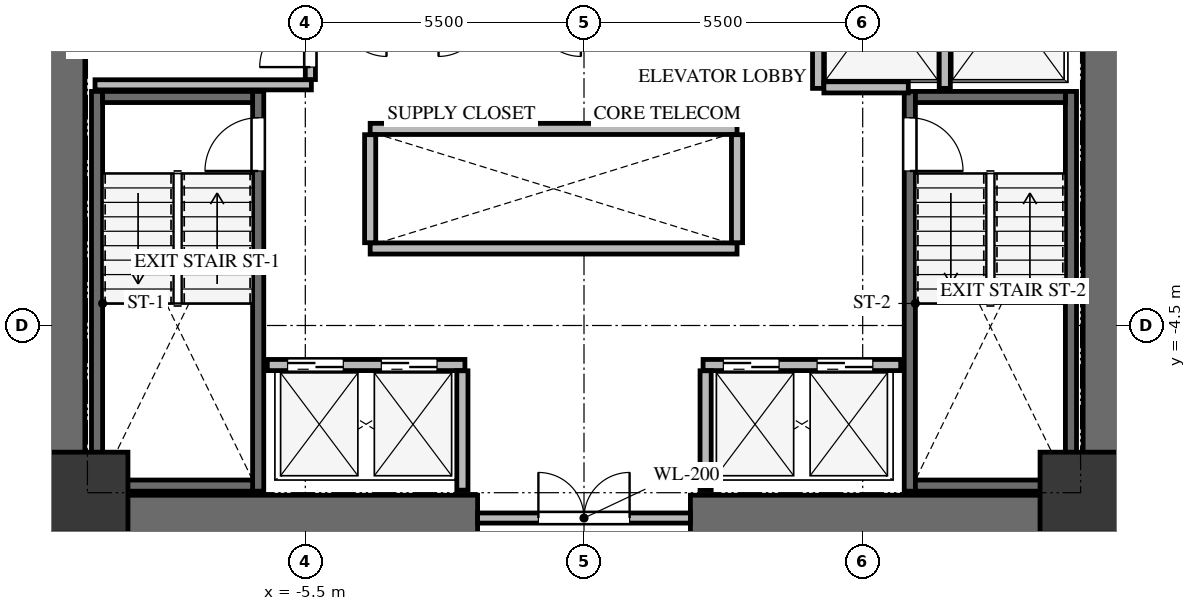
"""IFC4 building model, lengths in metres.
Left out: names, types, materials, properties, quantities, classifications, styles, units other than length and angle.
Written with IfcOpenShell. Run it as: python <this file> out.ifc"""

import sys

from ifc_helpers import new_model, si_unit, direction, frame, frame_2d, origin, origin_2d, place, context, subcontext, project, spatial, rectangle, extrude, source, transform, mapped, element, fill, save


model = new_model("IFC4")
c1 = context("Model", 3, precision=1e-05, world=origin(), true_north=direction((0.0, 1.0)))
c2 = subcontext(c1, "Body", "Model", "MODEL_VIEW")
j1 = project(units=[si_unit("LENGTHUNIT", "METRE"), si_unit("PLANEANGLEUNIT", "RADIAN")], contexts=[c1])
p1 = place(None, origin())
s1 = spatial("IfcSite", under=j1, at=p1, CompositionType="ELEMENT")
p2 = place(p1, origin())
s2 = spatial("IfcBuilding", under=s1, at=p2, CompositionType="ELEMENT")
p3 = place(p2, frame((0.0, 0.0, 52.2)))
s3 = spatial("IfcBuildingStorey", under=s2, at=p3, CompositionType="ELEMENT", Elevation=52.2)
for number, where, z_axis, x_axis in (
    (1, (-10.3, -8.75, 0.0), (0.0, 0.0, 1.0), (0.0, 1.0, 0.0)),
    (2, (10.3, -8.75, 0.0), (0.0, 0.0, 1.0), (0.0, 1.0, 0.0)),
):
    element("IfcWall", number, at=place(p3, frame(where, z_axis=z_axis, x_axis=x_axis)), inside=s3, PredefinedType="SHEAR", context=c2, shape_type="SweptSolid", body=[
        extrude(rectangle(XDim=17.5, YDim=0.9, at=frame_2d((8.75, 0.0))), origin(), (0.0, 0.0, 1.0), 3.3),
    ])
for number, where, z_axis, x_axis in (
    (3, (-9.85, -8.3, 0.0), (0.0, 0.0, 1.0), (1.0, 0.0, 0.0)),
    (4, (2.1, -8.3, 0.0), (0.0, 0.0, 1.0), (1.0, 0.0, 0.0)),
):
    element("IfcWall", number, at=place(p3, frame(where, z_axis=z_axis, x_axis=x_axis)), inside=s3, PredefinedType="SHEAR", context=c2, shape_type="SweptSolid", body=[
        extrude(rectangle(XDim=7.75, YDim=0.9, at=frame_2d((3.875, 0.0))), origin(), (0.0, 0.0, 1.0), 3.3),
    ])
p4 = place(p3, frame((-6.43, -7.77, -0.24), z_axis=(0.0, 0.0, 1.0), x_axis=(0.0, 1.0, 0.0)))
e5 = element("IfcWall", 5, at=p4, inside=s3, PredefinedType="SHEAR", context=c2, shape_type="SweptSolid", body=[
    extrude(rectangle(XDim=7.89, YDim=0.22, at=frame_2d((3.945, 0.0))), origin(), (0.0, 0.0, 1.0), 3.3),
])
p5 = place(p4, frame((6.32, 0.0, 0.0)))
e6 = element("IfcOpeningElement", 6, at=p5, cuts=e5, PredefinedType="OPENING", context=c2, shape_type="SweptSolid", body=[
    extrude(rectangle(XDim=1.05, YDim=2.15, at=frame_2d((0.525, 1.075))), frame((0.0, 0.12, 0.0), z_axis=(0.0, -1.0, 0.0), x_axis=(1.0, 0.0, 0.0)), (0.0, 0.0, 1.0), 0.24),
])
p6 = place(p3, frame((-9.61, 0.12, -0.24), z_axis=(0.0, 0.0, 1.0), x_axis=(0.0, -1.0, 0.0)))
e7 = element("IfcWall", 7, at=p6, inside=s3, PredefinedType="SHEAR", context=c2, shape_type="SweptSolid", body=[
    extrude(rectangle(XDim=7.89, YDim=0.22, at=frame_2d((3.945, 0.0))), origin(), (0.0, 0.0, 1.0), 3.3),
])
for number, where, z_axis, x_axis in (
    (8, (-9.5, -7.66, -0.24), (0.0, 0.0, 1.0), (1.0, 0.0, 0.0)),
    (9, (-6.54, 0.01, -0.24), (0.0, 0.0, 1.0), (-1.0, 0.0, 0.0)),
):
    element("IfcWall", number, at=place(p3, frame(where, z_axis=z_axis, x_axis=x_axis)), inside=s3, PredefinedType="SHEAR", context=c2, shape_type="SweptSolid", body=[
        extrude(rectangle(XDim=2.96, YDim=0.22, at=frame_2d((1.48, 0.0))), origin(), (0.0, 0.0, 1.0), 3.3),
    ])
p7 = place(p3, frame((9.61, -7.77, -0.24), z_axis=(0.0, 0.0, 1.0), x_axis=(0.0, 1.0, 0.0)))
e10 = element("IfcWall", 10, at=p7, inside=s3, PredefinedType="SHEAR", context=c2, shape_type="SweptSolid", body=[
    extrude(rectangle(XDim=7.89, YDim=0.22, at=frame_2d((3.945, 0.0))), origin(), (0.0, 0.0, 1.0), 3.3),
])
p8 = place(p3, frame((6.43, 0.12, -0.24), z_axis=(0.0, 0.0, 1.0), x_axis=(0.0, -1.0, 0.0)))
e11 = element("IfcWall", 11, at=p8, inside=s3, PredefinedType="SHEAR", context=c2, shape_type="SweptSolid", body=[
    extrude(rectangle(XDim=7.89, YDim=0.22, at=frame_2d((3.945, 0.0))), origin(), (0.0, 0.0, 1.0), 3.3),
])
p9 = place(p8, frame((0.52, 0.0, 0.0)))
e12 = element("IfcOpeningElement", 12, at=p9, cuts=e11, PredefinedType="OPENING", context=c2, shape_type="SweptSolid", body=[
    extrude(rectangle(XDim=1.05, YDim=2.15, at=frame_2d((0.525, 1.075))), frame((0.0, 0.12, 0.0), z_axis=(0.0, -1.0, 0.0), x_axis=(1.0, 0.0, 0.0)), (0.0, 0.0, 1.0), 0.24),
])
for number, where, z_axis, x_axis in (
    (13, (6.54, -7.66, -0.24), (0.0, 0.0, 1.0), (1.0, 0.0, 0.0)),
    (14, (9.5, 0.01, -0.24), (0.0, 0.0, 1.0), (-1.0, 0.0, 0.0)),
):
    element("IfcWall", number, at=place(p3, frame(where, z_axis=z_axis, x_axis=x_axis)), inside=s3, PredefinedType="SHEAR", context=c2, shape_type="SweptSolid", body=[
        extrude(rectangle(XDim=2.96, YDim=0.22, at=frame_2d((1.48, 0.0))), origin(), (0.0, 0.0, 1.0), 3.3),
    ])
m1 = source(origin(), c2, "Body", "SweptSolid", [
    extrude(rectangle(XDim=1.6, YDim=1.6, at=origin_2d()), origin(), (0.0, 0.0, 1.0), 3.3),
])
for number, where, z_axis, x_axis in (
    (15, (-9.8, -7.8, -0.24), (0.0, 0.0, 1.0), (1.0, 0.0, 0.0)),
    (16, (9.8, -7.8, -0.24), (0.0, 0.0, 1.0), (1.0, 0.0, 0.0)),
):
    element("IfcColumn", number, at=place(p3, frame(where, z_axis=z_axis, x_axis=x_axis)), inside=s3, PredefinedType="COLUMN", context=c2, shape_type="MappedRepresentation", body=[
        mapped(m1, transform((0.0, 0.0, 0.0), x_axis=(1.0, 0.0, 0.0), y_axis=(0.0, 1.0, 0.0), z_axis=(0.0, 0.0, 1.0), scale=1.0)),
    ])
p10 = place(p3, frame((-2.1, -8.3, 0.0), z_axis=(0.0, 0.0, 1.0), x_axis=(1.0, 0.0, 0.0)))
e17 = element("IfcWall", 17, at=p10, inside=s3, PredefinedType="SOLIDWALL", context=c2, shape_type="SweptSolid", body=[
    extrude(rectangle(XDim=4.2, YDim=0.2, at=frame_2d((2.1, 0.0))), origin(), (0.0, 0.0, 1.0), 3.045),
])
p11 = place(p10, frame((1.2, 0.0, 0.0)))
e18 = element("IfcOpeningElement", 18, at=p11, cuts=e17, PredefinedType="OPENING", context=c2, shape_type="SweptSolid", body=[
    extrude(rectangle(XDim=1.8, YDim=2.15, at=frame_2d((0.9, 1.075))), frame((0.0, 0.11, 0.0), z_axis=(0.0, -1.0, 0.0), x_axis=(1.0, 0.0, 0.0)), (0.0, 0.0, 1.0), 0.22),
])
p12 = place(p3, frame((-9.65, 0.25, 0.0), z_axis=(0.0, 0.0, 1.0), x_axis=(1.0, 0.0, 0.0)))
e19 = element("IfcWall", 19, at=p12, inside=s3, PredefinedType="SOLIDWALL", context=c2, shape_type="SweptSolid", body=[
    extrude(rectangle(XDim=4.27, YDim=0.2, at=frame_2d((2.135, 0.0))), origin(), (0.0, 0.0, 1.0), 3.045),
])
p13 = place(p3, frame((-5.4, 0.354, 0.0), z_axis=(0.0, 0.0, 1.0), x_axis=(0.0, 1.0, 0.0)))
e20 = element("IfcWall", 20, at=p13, inside=s3, PredefinedType="SOLIDWALL", context=c2, shape_type="SweptSolid", body=[
    extrude(rectangle(XDim=4.026, YDim=0.2, at=frame_2d((2.013, 0.0))), origin(), (0.0, 0.0, 1.0), 3.045),
])
p14 = place(p13, frame((0.246, 0.0, 0.0)))
e21 = element("IfcOpeningElement", 21, at=p14, cuts=e20, PredefinedType="OPENING", context=c2, shape_type="SweptSolid", body=[
    extrude(rectangle(XDim=1.0, YDim=2.15, at=frame_2d((0.5, 1.075))), frame((0.0, 0.11, 0.0), z_axis=(0.0, -1.0, 0.0), x_axis=(1.0, 0.0, 0.0)), (0.0, 0.0, 1.0), 0.22),
])
for number, where, z_axis, x_axis in (
    (22, (4.62, 0.18, 0.0), (0.0, 0.0, 1.0), (0.0, 1.0, 0.0)),
    (23, (7.12, 0.18, 0.0), (0.0, 0.0, 1.0), (0.0, 1.0, 0.0)),
):
    element("IfcWall", number, at=place(p3, frame(where, z_axis=z_axis, x_axis=x_axis)), inside=s3, PredefinedType="SOLIDWALL", context=c2, shape_type="SweptSolid", body=[
        extrude(rectangle(XDim=3.186, YDim=0.22, at=frame_2d((1.593, 0.0))), origin(), (0.0, 0.0, 1.0), 3.045),
    ])
p15 = place(p3, frame((4.734, 0.2, 0.0), z_axis=(0.0, 0.0, 1.0), x_axis=(1.0, 0.0, 0.0)))
e24 = element("IfcWall", 24, at=p15, inside=s3, PredefinedType="SOLIDWALL", context=c2, shape_type="SweptSolid", body=[
    extrude(rectangle(XDim=1.666, YDim=0.22, at=frame_2d((0.833, 0.0))), origin(), (0.0, 0.0, 1.0), 3.045),
])
p16 = place(p3, frame((-6.25, -5.28, 0.0), z_axis=(0.0, 0.0, 1.0), x_axis=(1.0, 0.0, 0.0)))
e25 = element("IfcWall", 25, at=p16, inside=s3, PredefinedType="SOLIDWALL", context=c2, shape_type="SweptSolid", body=[
    extrude(rectangle(XDim=3.9, YDim=0.22, at=frame_2d((1.95, 0.0))), origin(), (0.0, 0.0, 1.0), 3.045),
])
p17 = place(p16, frame((0.4, 0.0, 0.0)))
e26 = element("IfcOpeningElement", 26, at=p17, cuts=e25, PredefinedType="OPENING", context=c2, shape_type="SweptSolid", body=[
    extrude(rectangle(XDim=1.1, YDim=2.15, at=frame_2d((0.55, 1.075))), frame((0.0, 0.12, 0.0), z_axis=(0.0, -1.0, 0.0), x_axis=(1.0, 0.0, 0.0)), (0.0, 0.0, 1.0), 0.24),
])
p18 = place(p16, frame((2.25, 0.0, 0.0)))
e27 = element("IfcOpeningElement", 27, at=p18, cuts=e25, PredefinedType="OPENING", context=c2, shape_type="SweptSolid", body=[
    extrude(rectangle(XDim=1.1, YDim=2.15, at=frame_2d((0.55, 1.075))), frame((0.0, 0.12, 0.0), z_axis=(0.0, -1.0, 0.0), x_axis=(1.0, 0.0, 0.0)), (0.0, 0.0, 1.0), 0.24),
])
p19 = place(p3, frame((2.35, -5.28, 0.0), z_axis=(0.0, 0.0, 1.0), x_axis=(1.0, 0.0, 0.0)))
e28 = element("IfcWall", 28, at=p19, inside=s3, PredefinedType="SOLIDWALL", context=c2, shape_type="SweptSolid", body=[
    extrude(rectangle(XDim=3.9, YDim=0.22, at=frame_2d((1.95, 0.0))), origin(), (0.0, 0.0, 1.0), 3.045),
])
p20 = place(p19, frame((0.4, 0.0, 0.0)))
e29 = element("IfcOpeningElement", 29, at=p20, cuts=e28, PredefinedType="OPENING", context=c2, shape_type="SweptSolid", body=[
    extrude(rectangle(XDim=1.1, YDim=2.15, at=frame_2d((0.55, 1.075))), frame((0.0, 0.12, 0.0), z_axis=(0.0, -1.0, 0.0), x_axis=(1.0, 0.0, 0.0)), (0.0, 0.0, 1.0), 0.24),
])
p21 = place(p19, frame((2.25, 0.0, 0.0)))
e30 = element("IfcOpeningElement", 30, at=p21, cuts=e28, PredefinedType="OPENING", context=c2, shape_type="SweptSolid", body=[
    extrude(rectangle(XDim=1.1, YDim=2.15, at=frame_2d((0.55, 1.075))), frame((0.0, 0.12, 0.0), z_axis=(0.0, -1.0, 0.0), x_axis=(1.0, 0.0, 0.0)), (0.0, 0.0, 1.0), 0.24),
])
for number, where, z_axis, x_axis in (
    (31, (-2.4, -7.75, 0.0), (0.0, 0.0, 1.0), (0.0, 1.0, 0.0)),
    (32, (2.4, -7.75, 0.0), (0.0, 0.0, 1.0), (0.0, 1.0, 0.0)),
):
    element("IfcWall", number, at=place(p3, frame(where, z_axis=z_axis, x_axis=x_axis)), inside=s3, PredefinedType="SOLIDWALL", context=c2, shape_type="SweptSolid", body=[
        extrude(rectangle(XDim=2.356, YDim=0.22, at=frame_2d((1.178, 0.0))), origin(), (0.0, 0.0, 1.0), 3.045),
    ])
for number, where, z_axis, x_axis in (
    (33, (-4.22, -2.98, 0.0), (0.0, 0.0, 1.0), (1.0, 0.0, 0.0)),
    (34, (-4.22, -0.62, 0.0), (0.0, 0.0, 1.0), (1.0, 0.0, 0.0)),
):
    element("IfcWall", number, at=place(p3, frame(where, z_axis=z_axis, x_axis=x_axis)), inside=s3, PredefinedType="SOLIDWALL", context=c2, shape_type="SweptSolid", body=[
        extrude(rectangle(XDim=7.24, YDim=0.22, at=frame_2d((3.62, 0.0))), origin(), (0.0, 0.0, 1.0), 3.045),
    ])
for number, where, z_axis, x_axis in (
    (35, (-4.22, -2.866, 0.0), (0.0, 0.0, 1.0), (0.0, 1.0, 0.0)),
    (36, (3.02, -2.866, 0.0), (0.0, 0.0, 1.0), (0.0, 1.0, 0.0)),
):
    element("IfcWall", number, at=place(p3, frame(where, z_axis=z_axis, x_axis=x_axis)), inside=s3, PredefinedType="SOLIDWALL", context=c2, shape_type="SweptSolid", body=[
        extrude(rectangle(XDim=2.132, YDim=0.22, at=frame_2d((1.066, 0.0))), origin(), (0.0, 0.0, 1.0), 3.045),
    ])
m2 = source(origin(), c2, "Body", "SweptSolid", [
    extrude(rectangle(XDim=1.05, YDim=2.15, at=frame_2d((0.525, 1.075))), frame((0.0, 0.025, 0.0), z_axis=(0.0, -1.0, 0.0), x_axis=(1.0, 0.0, 0.0)), (0.0, 0.0, 1.0), 0.05),
])
p22 = place(p5, origin())
e37 = element("IfcDoor", 37, at=p22, inside=s3, OperationType="SINGLE_SWING_LEFT", PredefinedType="DOOR", context=c2, shape_type="MappedRepresentation", body=[
    mapped(m2, transform((0.0, 0.0, 0.0), x_axis=(1.0, 0.0, 0.0), y_axis=(0.0, 1.0, 0.0), z_axis=(0.0, 0.0, 1.0), scale=1.0)),
])
fill(e6, e37)
m3 = source(origin(), c2, "Body", "SweptSolid", [
    extrude(rectangle(XDim=1.05, YDim=2.15, at=frame_2d((0.525, 1.075))), frame((0.0, 0.025, 0.0), z_axis=(0.0, -1.0, 0.0), x_axis=(1.0, 0.0, 0.0)), (0.0, 0.0, 1.0), 0.05),
])
p23 = place(p9, origin())
e38 = element("IfcDoor", 38, at=p23, inside=s3, OperationType="SINGLE_SWING_RIGHT", PredefinedType="DOOR", context=c2, shape_type="MappedRepresentation", body=[
    mapped(m3, transform((0.0, 0.0, 0.0), x_axis=(1.0, 0.0, 0.0), y_axis=(0.0, 1.0, 0.0), z_axis=(0.0, 0.0, 1.0), scale=1.0)),
])
fill(e12, e38)
m4 = source(origin(), c2, "Body", "SweptSolid", [
    extrude(rectangle(XDim=1.8, YDim=2.15, at=frame_2d((0.9, 1.075))), frame((0.0, 0.025, 0.0), z_axis=(0.0, -1.0, 0.0), x_axis=(1.0, 0.0, 0.0)), (0.0, 0.0, 1.0), 0.05),
])
p24 = place(p11, origin())
e39 = element("IfcDoor", 39, at=p24, inside=s3, OperationType="DOUBLE_DOOR_SINGLE_SWING", PredefinedType="DOOR", context=c2, shape_type="MappedRepresentation", body=[
    mapped(m4, transform((0.0, 0.0, 0.0), x_axis=(1.0, 0.0, 0.0), y_axis=(0.0, 1.0, 0.0), z_axis=(0.0, 0.0, 1.0), scale=1.0)),
])
fill(e18, e39)
m5 = source(origin(), c2, "Body", "SweptSolid", [
    extrude(rectangle(XDim=1.0, YDim=2.15, at=frame_2d((0.5, 1.075))), frame((0.0, 0.025, 0.0), z_axis=(0.0, -1.0, 0.0), x_axis=(1.0, 0.0, 0.0)), (0.0, 0.0, 1.0), 0.05),
])
p25 = place(p14, origin())
e40 = element("IfcDoor", 40, at=p25, inside=s3, OperationType="SINGLE_SWING_LEFT", PredefinedType="DOOR", context=c2, shape_type="MappedRepresentation", body=[
    mapped(m5, transform((0.0, 0.0, 0.0), x_axis=(1.0, 0.0, 0.0), y_axis=(0.0, 1.0, 0.0), z_axis=(0.0, 0.0, 1.0), scale=1.0)),
])
fill(e21, e40)
m6 = source(origin(), c2, "Body", "SweptSolid", [
    extrude(rectangle(XDim=1.1, YDim=2.15, at=frame_2d((0.55, 1.075))), frame((0.0, 0.025, 0.0), z_axis=(0.0, -1.0, 0.0), x_axis=(1.0, 0.0, 0.0)), (0.0, 0.0, 1.0), 0.05),
])
p26 = place(p17, origin())
e41 = element("IfcDoor", 41, at=p26, inside=s3, OperationType="DOUBLE_DOOR_SLIDING", PredefinedType="DOOR", context=c2, shape_type="MappedRepresentation", body=[
    mapped(m6, transform((0.0, 0.0, 0.0), x_axis=(1.0, 0.0, 0.0), y_axis=(0.0, 1.0, 0.0), z_axis=(0.0, 0.0, 1.0), scale=1.0)),
])
fill(e26, e41)
p27 = place(p18, origin())
e42 = element("IfcDoor", 42, at=p27, inside=s3, OperationType="DOUBLE_DOOR_SLIDING", PredefinedType="DOOR", context=c2, shape_type="MappedRepresentation", body=[
    mapped(m6, transform((0.0, 0.0, 0.0), x_axis=(1.0, 0.0, 0.0), y_axis=(0.0, 1.0, 0.0), z_axis=(0.0, 0.0, 1.0), scale=1.0)),
])
fill(e27, e42)
p28 = place(p20, origin())
e43 = element("IfcDoor", 43, at=p28, inside=s3, OperationType="DOUBLE_DOOR_SLIDING", PredefinedType="DOOR", context=c2, shape_type="MappedRepresentation", body=[
    mapped(m6, transform((0.0, 0.0, 0.0), x_axis=(1.0, 0.0, 0.0), y_axis=(0.0, 1.0, 0.0), z_axis=(0.0, 0.0, 1.0), scale=1.0)),
])
fill(e29, e43)
p29 = place(p21, origin())
e44 = element("IfcDoor", 44, at=p29, inside=s3, OperationType="DOUBLE_DOOR_SLIDING", PredefinedType="DOOR", context=c2, shape_type="MappedRepresentation", body=[
    mapped(m6, transform((0.0, 0.0, 0.0), x_axis=(1.0, 0.0, 0.0), y_axis=(0.0, 1.0, 0.0), z_axis=(0.0, 0.0, 1.0), scale=1.0)),
])
fill(e30, e44)
save(model, sys.argv[1])
